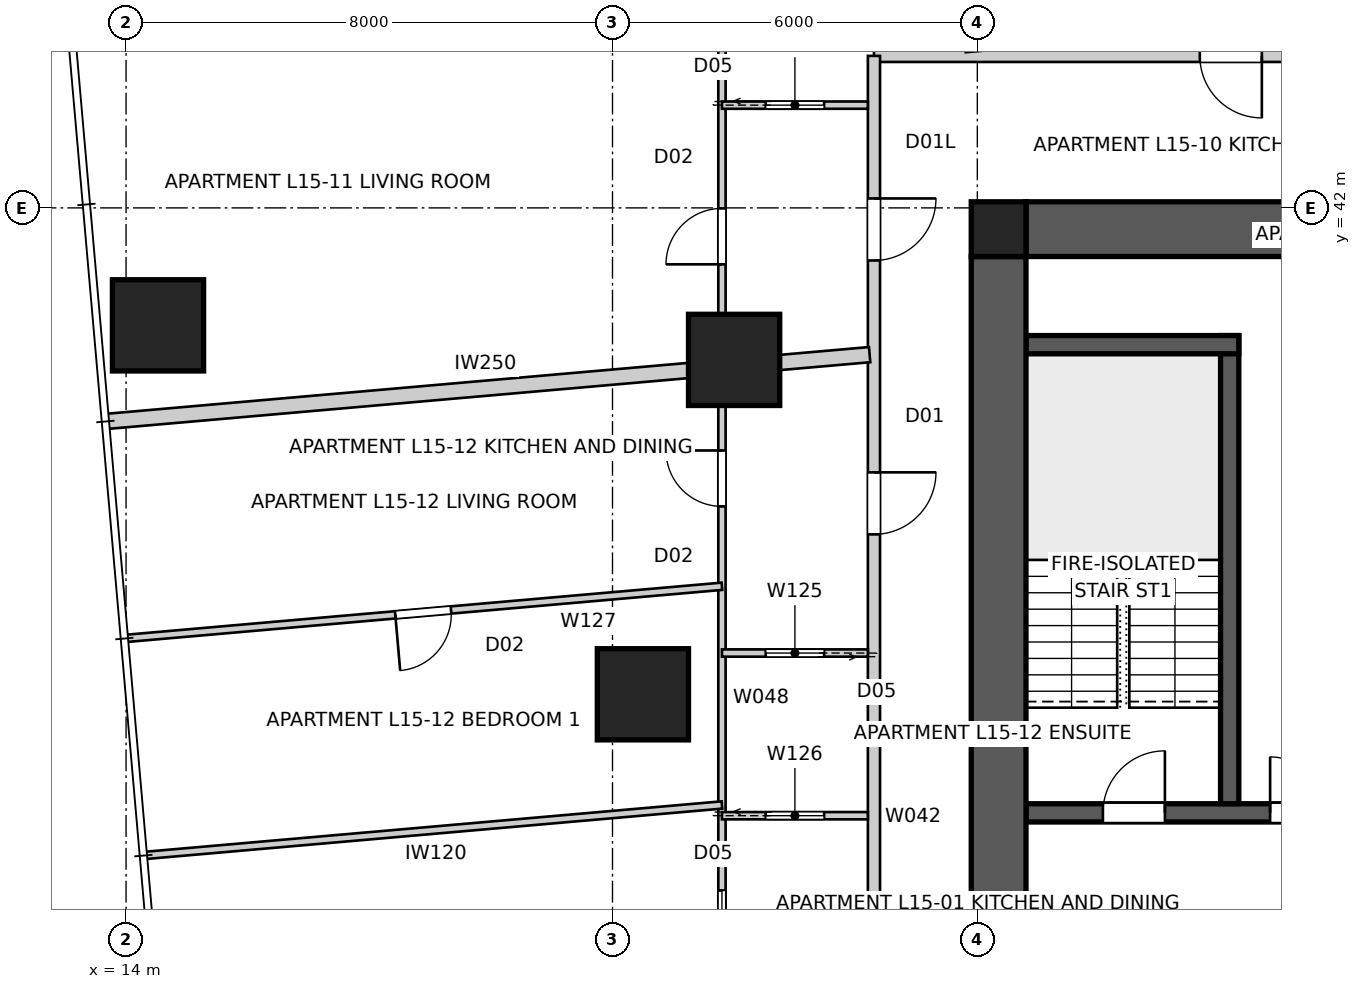
"""IFC4 building model, lengths in metres.
Left out: names, types, materials, properties, quantities, classifications, styles, units other than length and angle.
Written with IfcOpenShell. Run it as: python <this file> out.ifc"""

import sys

from ifc_helpers import new_model, si_unit, direction, frame, frame_2d, origin, origin_2d, place, context, subcontext, project, spatial, polyline, rectangle, outline, extrude, element, fill, save


model = new_model("IFC4")
c1 = context("Model", 3, precision=1e-05, world=origin(), true_north=direction((0.0, 1.0)))
c2 = subcontext(c1, "Body", "Model", "MODEL_VIEW")
j1 = project(units=[si_unit("LENGTHUNIT", "METRE"), si_unit("PLANEANGLEUNIT", "RADIAN")], contexts=[c1])
p1 = place(None, origin())
s1 = spatial("IfcSite", under=j1, at=p1, CompositionType="ELEMENT")
p2 = place(p1, origin())
s2 = spatial("IfcBuilding", under=s1, at=p2, CompositionType="ELEMENT")
p3 = place(p2, frame((0.0, 0.0, 57.4)))
s3 = spatial("IfcBuildingStorey", under=s2, at=p3, CompositionType="ELEMENT", Elevation=57.4)
p4 = place(p3, frame((28.8, 41.65, 0.0), z_axis=(0.0, 0.0, 1.0), x_axis=(1.0, 0.0, 0.0)))
e1 = element("IfcWall", 1, at=p4, inside=s3, PredefinedType="SHEAR", context=c2, shape_type="SweptSolid", body=[
    extrude(outline(polyline([(0.0, -0.45), (22.4, -0.45), (22.4, -0.025), (22.85, -0.025), (22.85, 0.025), (22.4, 0.025), (22.4, 0.45), (0.0, 0.45), (0.0, 0.025), (-0.45, 0.025), (-0.45, -0.025), (0.0, -0.025), (0.0, -0.45)])), origin(), (0.0, 0.0, 1.0), 3.4),
])
p5 = place(p3, frame((28.35, 41.2, 0.0), z_axis=(0.0, 0.0, 1.0), x_axis=(0.0, -1.0, 0.0)))
e2 = element("IfcWall", 2, at=p5, inside=s3, PredefinedType="SHEAR", context=c2, shape_type="SweptSolid", body=[
    extrude(outline(polyline([(0.0, -0.45), (22.4, -0.45), (22.4, -0.025), (22.85, -0.025), (22.85, 0.025), (22.4, 0.025), (22.4, 0.45), (0.0, 0.45), (0.0, 0.025), (-0.45, 0.025), (-0.45, -0.025), (0.0, -0.025), (0.0, -0.45)])), origin(), (0.0, 0.0, 1.0), 3.4),
])
p6 = place(p5, frame((11.14, 0.0, 0.0)))
e3 = element("IfcOpeningElement", 3, at=p6, cuts=e2, PredefinedType="OPENING", context=c2, shape_type="SweptSolid", body=[
    extrude(rectangle(XDim=1.02, YDim=2.4, at=frame_2d((0.51, 1.2))), frame((0.0, 0.46, 0.0), z_axis=(0.0, -1.0, 0.0), x_axis=(1.0, 0.0, 0.0)), (0.0, 0.0, 1.0), 0.92),
])
p7 = place(p3, frame((28.8, 32.05, 0.0), z_axis=(0.0, 0.0, 1.0), x_axis=(1.0, 0.0, 0.0)))
e4 = element("IfcWall", 4, at=p7, inside=s3, PredefinedType="SHEAR", context=c2, shape_type="SweptSolid", body=[
    extrude(rectangle(XDim=22.4, YDim=0.3, at=frame_2d((11.2, 0.0))), origin(), (0.0, 0.0, 1.0), 3.4),
])
p8 = place(p7, frame((19.04, 0.0, 0.0)))
e5 = element("IfcOpeningElement", 5, at=p8, cuts=e4, PredefinedType="OPENING", context=c2, shape_type="SweptSolid", body=[
    extrude(rectangle(XDim=0.92, YDim=2.1, at=frame_2d((0.46, 1.05))), frame((0.0, 0.16, 0.0), z_axis=(0.0, -1.0, 0.0), x_axis=(1.0, 0.0, 0.0)), (0.0, 0.0, 1.0), 0.32),
])
p9 = place(p7, frame((1.265, 0.0, 0.0)))
e6 = element("IfcOpeningElement", 6, at=p9, cuts=e4, PredefinedType="OPENING", context=c2, shape_type="SweptSolid", body=[
    extrude(rectangle(XDim=1.02, YDim=2.1, at=frame_2d((0.51, 1.05))), frame((0.0, 0.16, 0.0), z_axis=(0.0, -1.0, 0.0), x_axis=(1.0, 0.0, 0.0)), (0.0, 0.0, 1.0), 0.32),
])
p10 = place(p7, frame((4.015, 0.0, 0.0)))
e7 = element("IfcOpeningElement", 7, at=p10, cuts=e4, PredefinedType="OPENING", context=c2, shape_type="SweptSolid", body=[
    extrude(rectangle(XDim=0.92, YDim=2.1, at=frame_2d((0.46, 1.05))), frame((0.0, 0.16, 0.0), z_axis=(0.0, -1.0, 0.0), x_axis=(1.0, 0.0, 0.0)), (0.0, 0.0, 1.0), 0.32),
])
p11 = place(p7, frame((6.45, 0.0, 0.0)))
e8 = element("IfcOpeningElement", 8, at=p11, cuts=e4, PredefinedType="OPENING", context=c2, shape_type="SweptSolid", body=[
    extrude(rectangle(XDim=1.1, YDim=2.1, at=frame_2d((0.55, 1.05))), frame((0.0, 0.16, 0.0), z_axis=(0.0, -1.0, 0.0), x_axis=(1.0, 0.0, 0.0)), (0.0, 0.0, 1.0), 0.32),
])
p12 = place(p7, frame((9.25, 0.0, 0.0)))
e9 = element("IfcOpeningElement", 9, at=p12, cuts=e4, PredefinedType="OPENING", context=c2, shape_type="SweptSolid", body=[
    extrude(rectangle(XDim=1.1, YDim=2.1, at=frame_2d((0.55, 1.05))), frame((0.0, 0.16, 0.0), z_axis=(0.0, -1.0, 0.0), x_axis=(1.0, 0.0, 0.0)), (0.0, 0.0, 1.0), 0.32),
])
p13 = place(p7, frame((14.85, 0.0, 0.0)))
e10 = element("IfcOpeningElement", 10, at=p13, cuts=e4, PredefinedType="OPENING", context=c2, shape_type="SweptSolid", body=[
    extrude(rectangle(XDim=1.1, YDim=2.1, at=frame_2d((0.55, 1.05))), frame((0.0, 0.16, 0.0), z_axis=(0.0, -1.0, 0.0), x_axis=(1.0, 0.0, 0.0)), (0.0, 0.0, 1.0), 0.32),
])
p14 = place(p3, frame((32.15, 32.2, 0.0), z_axis=(0.0, 0.0, 1.0), x_axis=(0.0, 1.0, 0.0)))
e11 = element("IfcWall", 11, at=p14, inside=s3, PredefinedType="SHEAR", context=c2, shape_type="SweptSolid", body=[
    extrude(rectangle(XDim=7.7, YDim=0.3, at=frame_2d((3.85, 0.0))), origin(), (0.0, 0.0, 1.0), 3.4),
])
p15 = place(p3, frame((28.8, 39.75, 0.0), z_axis=(0.0, 0.0, 1.0), x_axis=(1.0, 0.0, 0.0)))
e12 = element("IfcWall", 12, at=p15, inside=s3, PredefinedType="SHEAR", context=c2, shape_type="SweptSolid", body=[
    extrude(rectangle(XDim=3.5, YDim=0.3, at=frame_2d((1.75, 0.0))), origin(), (0.0, 0.0, 1.0), 3.4),
])
p16 = place(p3, frame((28.35, 41.65, 0.0), z_axis=(0.0, 0.0, 1.0), x_axis=(1.0, 0.0, 0.0)))
e13 = element("IfcColumn", 13, at=p16, inside=s3, PredefinedType="COLUMN", context=c2, shape_type="SweptSolid", body=[
    extrude(rectangle(XDim=0.9, YDim=0.9, at=origin_2d()), origin(), (0.0, 0.0, 1.0), 3.4),
])
for number, where, z_axis, x_axis in (
    (14, (14.526, 40.068, 0.0), (0.0, 0.0, 1.0), (1.0, 0.0, 0.0)),
    (15, (24.0, 39.5, 0.0), (0.0, 0.0, 1.0), (1.0, 0.0, 0.0)),
    (16, (22.5, 34.0, 0.0), (0.0, 0.0, 1.0), (1.0, 0.0, 0.0)),
):
    element("IfcColumn", number, at=place(p3, frame(where, z_axis=z_axis, x_axis=x_axis)), inside=s3, PredefinedType="COLUMN", context=c2, shape_type="SweptSolid", body=[
        extrude(rectangle(XDim=1.5, YDim=1.5, at=origin_2d()), origin(), (0.0, 0.0, 1.0), 3.4),
    ])
p17 = place(p3, frame((53.7, 44.5, 0.0), z_axis=(0.0, 0.0, 1.0), x_axis=(-1.0, 0.0, 0.0)))
e17 = element("IfcWall", 17, at=p17, inside=s3, PredefinedType="PARTITIONING", context=c2, shape_type="SweptSolid", body=[
    extrude(rectangle(XDim=27.4, YDim=0.2, at=frame_2d((13.7, 0.0))), origin(), (0.0, 0.0, 1.0), 3.25),
])
p18 = place(p17, frame((21.021, 0.0, 0.0)))
e18 = element("IfcOpeningElement", 18, at=p18, cuts=e17, PredefinedType="OPENING", context=c2, shape_type="SweptSolid", body=[
    extrude(rectangle(XDim=1.02, YDim=2.34, at=frame_2d((0.51, 1.17))), frame((0.0, 0.11, 0.0), z_axis=(0.0, -1.0, 0.0), x_axis=(1.0, 0.0, 0.0)), (0.0, 0.0, 1.0), 0.22),
])
p19 = place(p17, frame((6.201, 0.0, 0.0)))
e19 = element("IfcOpeningElement", 19, at=p19, cuts=e17, PredefinedType="OPENING", context=c2, shape_type="SweptSolid", body=[
    extrude(rectangle(XDim=1.02, YDim=2.34, at=frame_2d((0.51, 1.17))), frame((0.0, 0.11, 0.0), z_axis=(0.0, -1.0, 0.0), x_axis=(1.0, 0.0, 0.0)), (0.0, 0.0, 1.0), 0.22),
])
p20 = place(p3, frame((26.3, 44.5, 0.0), z_axis=(0.0, 0.0, 1.0), x_axis=(0.0, -1.0, 0.0)))
e20 = element("IfcWall", 20, at=p20, inside=s3, PredefinedType="PARTITIONING", context=c2, shape_type="SweptSolid", body=[
    extrude(rectangle(XDim=29.0, YDim=0.2, at=frame_2d((14.5, 0.0))), origin(), (0.0, 0.0, 1.0), 3.25),
])
p21 = place(p20, frame((6.85, 0.0, 0.0)))
e21 = element("IfcOpeningElement", 21, at=p21, cuts=e20, PredefinedType="OPENING", context=c2, shape_type="SweptSolid", body=[
    extrude(rectangle(XDim=1.02, YDim=2.34, at=frame_2d((0.51, 1.17))), frame((0.0, 0.11, 0.0), z_axis=(0.0, -1.0, 0.0), x_axis=(1.0, 0.0, 0.0)), (0.0, 0.0, 1.0), 0.22),
])
p22 = place(p20, frame((2.345, 0.0, 0.0)))
e22 = element("IfcOpeningElement", 22, at=p22, cuts=e20, PredefinedType="OPENING", context=c2, shape_type="SweptSolid", body=[
    extrude(rectangle(XDim=1.02, YDim=2.1, at=frame_2d((0.51, 1.05))), frame((0.0, 0.11, 0.0), z_axis=(0.0, -1.0, 0.0), x_axis=(1.0, 0.0, 0.0)), (0.0, 0.0, 1.0), 0.22),
])
p23 = place(p20, frame((17.166, 0.0, 0.0)))
e23 = element("IfcOpeningElement", 23, at=p23, cuts=e20, PredefinedType="OPENING", context=c2, shape_type="SweptSolid", body=[
    extrude(rectangle(XDim=1.02, YDim=2.34, at=frame_2d((0.51, 1.17))), frame((0.0, 0.11, 0.0), z_axis=(0.0, -1.0, 0.0), x_axis=(1.0, 0.0, 0.0)), (0.0, 0.0, 1.0), 0.22),
])
p24 = place(p20, frame((27.055, 0.0, 0.0)))
e24 = element("IfcOpeningElement", 24, at=p24, cuts=e20, PredefinedType="OPENING", context=c2, shape_type="SweptSolid", body=[
    extrude(rectangle(XDim=1.02, YDim=2.34, at=frame_2d((0.51, 1.17))), frame((0.0, 0.11, 0.0), z_axis=(0.0, -1.0, 0.0), x_axis=(1.0, 0.0, 0.0)), (0.0, 0.0, 1.0), 0.22),
])
p25 = place(p3, frame((13.66, 38.487, 0.0), z_axis=(0.0, 0.0, 1.0), x_axis=(0.996194851608, 0.087153988028, 0.0)))
e25 = element("IfcWall", 25, at=p25, inside=s3, PredefinedType="PARTITIONING", context=c2, shape_type="SweptSolid", body=[
    extrude(rectangle(XDim=12.617, YDim=0.25, at=frame_2d((6.309, 0.0))), origin(), (0.0, 0.0, 1.0), 3.25),
])
p26 = place(p3, frame((27.068, 54.466, 0.0), z_axis=(0.0, 0.0, 1.0), x_axis=(0.087157803114, -0.996194517831, 0.0)))
e26 = element("IfcWall", 26, at=p26, inside=s3, PredefinedType="PARTITIONING", context=c2, shape_type="SweptSolid", body=[
    extrude(rectangle(XDim=9.933, YDim=0.25, at=frame_2d((4.966, 0.0))), origin(), (0.0, 0.0, 1.0), 3.25),
])
p27 = place(p3, frame((23.8, 24.936, 0.0), z_axis=(0.0, 0.0, 1.0), x_axis=(0.0, 1.0, 0.0)))
e27 = element("IfcWall", 27, at=p27, inside=s3, PredefinedType="PARTITIONING", context=c2, shape_type="SweptSolid", body=[
    extrude(rectangle(XDim=22.064, YDim=0.12, at=frame_2d((11.032, 0.0))), origin(), (0.0, 0.0, 1.0), 2.549),
])
p28 = place(p27, frame((12.155, 0.0, 0.0)))
e28 = element("IfcOpeningElement", 28, at=p28, cuts=e27, PredefinedType="OPENING", context=c2, shape_type="SweptSolid", body=[
    extrude(rectangle(XDim=0.92, YDim=2.34, at=frame_2d((0.46, 1.17))), frame((0.0, 0.07, 0.0), z_axis=(0.0, -1.0, 0.0), x_axis=(1.0, 0.0, 0.0)), (0.0, 0.0, 1.0), 0.14),
])
p29 = place(p27, frame((16.136, 0.0, 0.0)))
e29 = element("IfcOpeningElement", 29, at=p29, cuts=e27, PredefinedType="OPENING", context=c2, shape_type="SweptSolid", body=[
    extrude(rectangle(XDim=0.92, YDim=2.34, at=frame_2d((0.46, 1.17))), frame((0.0, 0.07, 0.0), z_axis=(0.0, -1.0, 0.0), x_axis=(1.0, 0.0, 0.0)), (0.0, 0.0, 1.0), 0.14),
])
p30 = place(p27, frame((1.964, 0.0, 0.0)))
e30 = element("IfcOpeningElement", 30, at=p30, cuts=e27, PredefinedType="OPENING", context=c2, shape_type="SweptSolid", body=[
    extrude(rectangle(XDim=0.92, YDim=2.34, at=frame_2d((0.46, 1.17))), frame((0.0, 0.07, 0.0), z_axis=(0.0, -1.0, 0.0), x_axis=(1.0, 0.0, 0.0)), (0.0, 0.0, 1.0), 0.14),
])
p31 = place(p27, frame((4.877, 0.0, 0.0)))
e31 = element("IfcOpeningElement", 31, at=p31, cuts=e27, PredefinedType="OPENING", context=c2, shape_type="SweptSolid", body=[
    extrude(rectangle(XDim=0.96, YDim=2.1, at=frame_2d((0.48, 1.05))), frame((0.0, 0.07, 0.0), z_axis=(0.0, -1.0, 0.0), x_axis=(1.0, 0.0, 0.0)), (0.0, 0.0, 1.0), 0.14),
])
p32 = place(p3, frame((23.8, 43.69, 0.0), z_axis=(0.0, 0.0, 1.0), x_axis=(1.0, 0.0, 0.0)))
e32 = element("IfcWall", 32, at=p32, inside=s3, PredefinedType="PARTITIONING", context=c2, shape_type="SweptSolid", body=[
    extrude(rectangle(XDim=2.4, YDim=0.12, at=frame_2d((1.2, 0.0))), origin(), (0.0, 0.0, 1.0), 3.25),
])
p33 = place(p32, frame((0.72, 0.0, 0.0)))
e33 = element("IfcOpeningElement", 33, at=p33, cuts=e32, PredefinedType="OPENING", context=c2, shape_type="SweptSolid", body=[
    extrude(rectangle(XDim=0.96, YDim=2.1, at=frame_2d((0.48, 1.05))), frame((0.0, 0.07, 0.0), z_axis=(0.0, -1.0, 0.0), x_axis=(1.0, 0.0, 0.0)), (0.0, 0.0, 1.0), 0.14),
])
p34 = place(p3, frame((26.2, 34.678, 0.0), z_axis=(0.0, 0.0, 1.0), x_axis=(-1.0, 0.0, 0.0)))
e34 = element("IfcWall", 34, at=p34, inside=s3, PredefinedType="PARTITIONING", context=c2, shape_type="SweptSolid", body=[
    extrude(rectangle(XDim=2.4, YDim=0.12, at=frame_2d((1.2, 0.0))), origin(), (0.0, 0.0, 1.0), 3.25),
])
p35 = place(p34, frame((0.72, 0.0, 0.0)))
e35 = element("IfcOpeningElement", 35, at=p35, cuts=e34, PredefinedType="OPENING", context=c2, shape_type="SweptSolid", body=[
    extrude(rectangle(XDim=0.96, YDim=2.1, at=frame_2d((0.48, 1.05))), frame((0.0, 0.07, 0.0), z_axis=(0.0, -1.0, 0.0), x_axis=(1.0, 0.0, 0.0)), (0.0, 0.0, 1.0), 0.14),
])
p36 = place(p3, frame((23.8, 32.003, 0.0), z_axis=(0.0, 0.0, 1.0), x_axis=(1.0, 0.0, 0.0)))
e36 = element("IfcWall", 36, at=p36, inside=s3, PredefinedType="PARTITIONING", context=c2, shape_type="SweptSolid", body=[
    extrude(rectangle(XDim=2.4, YDim=0.12, at=frame_2d((1.2, 0.0))), origin(), (0.0, 0.0, 1.0), 3.25),
])
p37 = place(p36, frame((0.72, 0.0, 0.0)))
e37 = element("IfcOpeningElement", 37, at=p37, cuts=e36, PredefinedType="OPENING", context=c2, shape_type="SweptSolid", body=[
    extrude(rectangle(XDim=0.96, YDim=2.1, at=frame_2d((0.48, 1.05))), frame((0.0, 0.07, 0.0), z_axis=(0.0, -1.0, 0.0), x_axis=(1.0, 0.0, 0.0)), (0.0, 0.0, 1.0), 0.14),
])
p38 = place(p3, frame((23.8, 35.777, 0.0), z_axis=(0.0, 0.0, 1.0), x_axis=(-0.996195794011, -0.087143215425, 0.0)))
e38 = element("IfcWall", 38, at=p38, inside=s3, PredefinedType="PARTITIONING", context=c2, shape_type="SweptSolid", body=[
    extrude(rectangle(XDim=9.825, YDim=0.12, at=frame_2d((4.913, 0.0))), origin(), (0.0, 0.0, 1.0), 2.796),
])
p39 = place(p38, frame((4.473, 0.0, 0.0)))
e39 = element("IfcOpeningElement", 39, at=p39, cuts=e38, PredefinedType="OPENING", context=c2, shape_type="SweptSolid", body=[
    extrude(rectangle(XDim=0.92, YDim=2.34, at=frame_2d((0.46, 1.17))), frame((0.0, 0.07, 0.0), z_axis=(0.0, -1.0, 0.0), x_axis=(1.0, 0.0, 0.0)), (0.0, 0.0, 1.0), 0.14),
])
p40 = place(p3, frame((23.8, 32.18, 0.0), z_axis=(0.0, 0.0, 1.0), x_axis=(-0.996193828936, -0.087165676674, 0.0)))
e40 = element("IfcWall", 40, at=p40, inside=s3, PredefinedType="PARTITIONING", context=c2, shape_type="SweptSolid", body=[
    extrude(rectangle(XDim=9.512, YDim=0.12, at=frame_2d((4.756, 0.0))), origin(), (0.0, 0.0, 1.0), 3.25),
])
p41 = place(p9, origin())
e41 = element("IfcDoor", 41, at=p41, inside=s3, OperationType="SINGLE_SWING_RIGHT", PredefinedType="DOOR", context=c2, shape_type="SweptSolid", body=[
    extrude(rectangle(XDim=1.02, YDim=2.1, at=frame_2d((0.51, 1.05))), frame((0.0, 0.025, 0.0), z_axis=(0.0, -1.0, 0.0), x_axis=(1.0, 0.0, 0.0)), (0.0, 0.0, 1.0), 0.05),
])
fill(e6, e41)
p42 = place(p10, origin())
e42 = element("IfcDoor", 42, at=p42, inside=s3, OperationType="SINGLE_SWING_LEFT", PredefinedType="DOOR", context=c2, shape_type="SweptSolid", body=[
    extrude(rectangle(XDim=0.92, YDim=2.1, at=frame_2d((0.46, 1.05))), frame((0.0, 0.025, 0.0), z_axis=(0.0, -1.0, 0.0), x_axis=(1.0, 0.0, 0.0)), (0.0, 0.0, 1.0), 0.05),
])
fill(e7, e42)
p43 = place(p18, origin())
e43 = element("IfcDoor", 43, at=p43, inside=s3, OperationType="SINGLE_SWING_LEFT", PredefinedType="DOOR", context=c2, shape_type="SweptSolid", body=[
    extrude(rectangle(XDim=1.02, YDim=2.34, at=frame_2d((0.51, 1.17))), frame((0.0, 0.025, 0.0), z_axis=(0.0, -1.0, 0.0), x_axis=(1.0, 0.0, 0.0)), (0.0, 0.0, 1.0), 0.05),
])
fill(e18, e43)
p44 = place(p21, origin())
e44 = element("IfcDoor", 44, at=p44, inside=s3, OperationType="SINGLE_SWING_LEFT", PredefinedType="DOOR", context=c2, shape_type="SweptSolid", body=[
    extrude(rectangle(XDim=1.02, YDim=2.34, at=frame_2d((0.51, 1.17))), frame((0.0, 0.025, 0.0), z_axis=(0.0, -1.0, 0.0), x_axis=(1.0, 0.0, 0.0)), (0.0, 0.0, 1.0), 0.05),
])
fill(e21, e44)
p45 = place(p22, origin())
e45 = element("IfcDoor", 45, at=p45, inside=s3, OperationType="SINGLE_SWING_LEFT", PredefinedType="DOOR", context=c2, shape_type="SweptSolid", body=[
    extrude(rectangle(XDim=1.02, YDim=2.1, at=frame_2d((0.51, 1.05))), frame((0.0, 0.025, 0.0), z_axis=(0.0, -1.0, 0.0), x_axis=(1.0, 0.0, 0.0)), (0.0, 0.0, 1.0), 0.05),
])
fill(e22, e45)
p46 = place(p28, origin())
e46 = element("IfcDoor", 46, at=p46, inside=s3, OperationType="SINGLE_SWING_RIGHT", PredefinedType="DOOR", context=c2, shape_type="SweptSolid", body=[
    extrude(rectangle(XDim=0.92, YDim=2.34, at=frame_2d((0.46, 1.17))), frame((0.0, 0.025, 0.0), z_axis=(0.0, -1.0, 0.0), x_axis=(1.0, 0.0, 0.0)), (0.0, 0.0, 1.0), 0.05),
])
fill(e28, e46)
p47 = place(p35, origin())
e47 = element("IfcDoor", 47, at=p47, inside=s3, OperationType="SLIDING_TO_LEFT", PredefinedType="DOOR", context=c2, shape_type="SweptSolid", body=[
    extrude(rectangle(XDim=0.96, YDim=2.1, at=frame_2d((0.48, 1.05))), frame((0.0, 0.025, 0.0), z_axis=(0.0, -1.0, 0.0), x_axis=(1.0, 0.0, 0.0)), (0.0, 0.0, 1.0), 0.05),
])
fill(e35, e47)
p48 = place(p29, origin())
e48 = element("IfcDoor", 48, at=p48, inside=s3, OperationType="SINGLE_SWING_LEFT", PredefinedType="DOOR", context=c2, shape_type="SweptSolid", body=[
    extrude(rectangle(XDim=0.92, YDim=2.34, at=frame_2d((0.46, 1.17))), frame((0.0, 0.025, 0.0), z_axis=(0.0, -1.0, 0.0), x_axis=(1.0, 0.0, 0.0)), (0.0, 0.0, 1.0), 0.05),
])
fill(e29, e48)
p49 = place(p33, origin())
e49 = element("IfcDoor", 49, at=p49, inside=s3, OperationType="SLIDING_TO_LEFT", PredefinedType="DOOR", context=c2, shape_type="SweptSolid", body=[
    extrude(rectangle(XDim=0.96, YDim=2.1, at=frame_2d((0.48, 1.05))), frame((0.0, 0.025, 0.0), z_axis=(0.0, -1.0, 0.0), x_axis=(1.0, 0.0, 0.0)), (0.0, 0.0, 1.0), 0.05),
])
fill(e33, e49)
p50 = place(p39, origin())
e50 = element("IfcDoor", 50, at=p50, inside=s3, OperationType="SINGLE_SWING_RIGHT", PredefinedType="DOOR", context=c2, shape_type="SweptSolid", body=[
    extrude(rectangle(XDim=0.92, YDim=2.34, at=frame_2d((0.46, 1.17))), frame((0.0, 0.025, 0.0), z_axis=(0.0, -1.0, 0.0), x_axis=(1.0, 0.0, 0.0)), (0.0, 0.0, 1.0), 0.05),
])
fill(e39, e50)
p51 = place(p37, origin())
e51 = element("IfcDoor", 51, at=p51, inside=s3, OperationType="SLIDING_TO_LEFT", PredefinedType="DOOR", context=c2, shape_type="SweptSolid", body=[
    extrude(rectangle(XDim=0.96, YDim=2.1, at=frame_2d((0.48, 1.05))), frame((0.0, 0.025, 0.0), z_axis=(0.0, -1.0, 0.0), x_axis=(1.0, 0.0, 0.0)), (0.0, 0.0, 1.0), 0.05),
])
fill(e37, e51)
p52 = place(p31, origin())
e52 = element("IfcDoor", 52, at=p52, inside=s3, OperationType="SLIDING_TO_LEFT", PredefinedType="DOOR", context=c2, shape_type="SweptSolid", body=[
    extrude(rectangle(XDim=0.96, YDim=2.1, at=frame_2d((0.48, 1.05))), frame((0.0, 0.025, 0.0), z_axis=(0.0, -1.0, 0.0), x_axis=(1.0, 0.0, 0.0)), (0.0, 0.0, 1.0), 0.05),
])
fill(e31, e52)
save(model, sys.argv[1])
